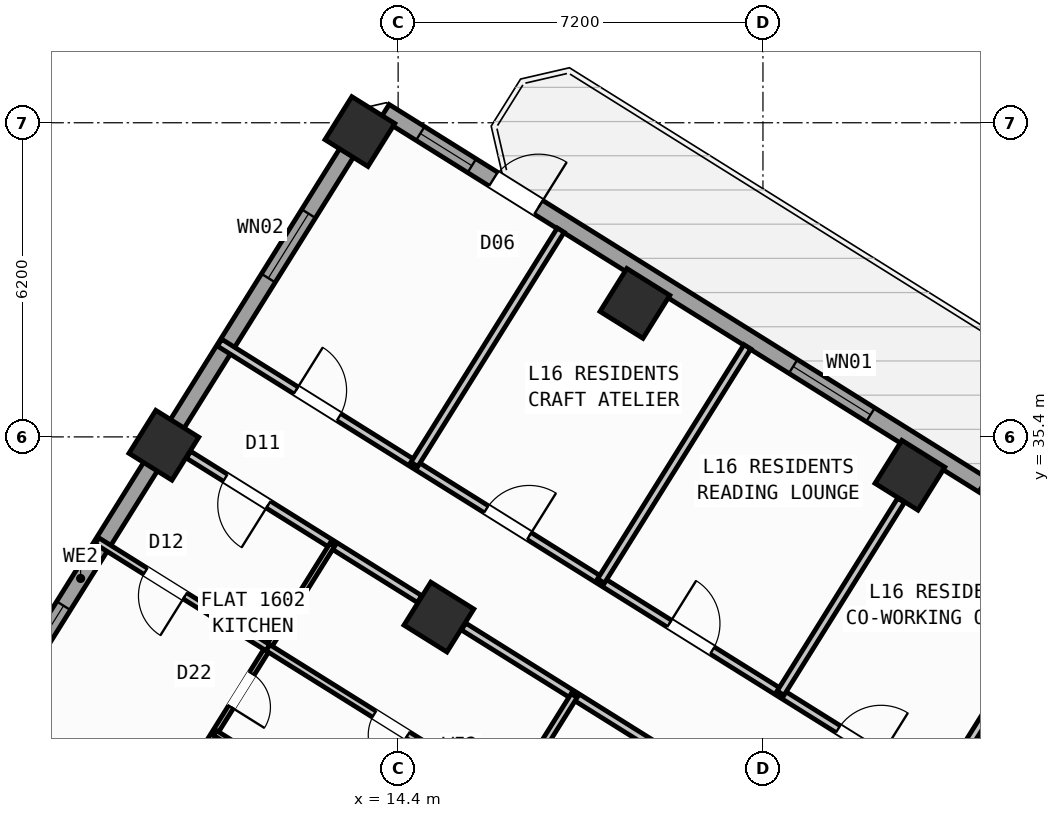
"""IFC4 building model, lengths in metres.
Left out: names, types, materials, properties, quantities, classifications, styles, units other than length and angle.
Written with IfcOpenShell. Run it as: python <this file> out.ifc"""

import sys

from ifc_helpers import new_model, si_unit, direction, frame, frame_2d, origin, origin_2d, place, context, subcontext, project, spatial, rectangle, hollow_rectangle, extrude, source, transform, mapped, element, fill, save


model = new_model("IFC4")
c1 = context("Model", 3, precision=1e-05, world=origin(), true_north=direction((0.0, 1.0)))
c2 = subcontext(c1, "Body", "Model", "MODEL_VIEW")
j1 = project(units=[si_unit("LENGTHUNIT", "METRE"), si_unit("PLANEANGLEUNIT", "RADIAN")], contexts=[c1])
p1 = place(None, origin())
s1 = spatial("IfcSite", under=j1, at=p1, CompositionType="ELEMENT")
p2 = place(p1, origin())
s2 = spatial("IfcBuilding", under=s1, at=p2, CompositionType="ELEMENT")
p3 = place(p2, frame((0.0, 0.0, 63.6)))
s3 = spatial("IfcBuildingStorey", under=s2, at=p3, CompositionType="ELEMENT", Elevation=63.6)
m1 = source(origin(), c2, "Body", "SweptSolid", [
    extrude(hollow_rectangle(XDim=1.0, YDim=1.0, WallThickness=0.04, at=origin_2d()), origin(), (0.0, 0.0, 1.0), 3.6),
])
for number, where, z_axis, x_axis in (
    (1, (24.5, 34.643, 0.0), (0.0, 0.0, 1.0), (-0.848, 0.53, 0.0)),
    (2, (19.073, 38.034, 0.0), (0.0, 0.0, 1.0), (-0.848, 0.53, 0.0)),
    (3, (15.205, 31.844, 0.0), (0.0, 0.0, 1.0), (-0.848, 0.53, 0.0)),
    (4, (13.646, 41.426, 0.0), (0.0, 0.0, 1.0), (-0.848, 0.53, 0.0)),
    (5, (9.777, 35.235, 0.0), (0.0, 0.0, 1.0), (-0.848, 0.53, 0.0)),
):
    element("IfcColumn", number, at=place(p3, frame(where, z_axis=z_axis, x_axis=x_axis)), inside=s3, PredefinedType="COLUMN", context=c2, shape_type="MappedRepresentation", body=[
        mapped(m1, transform((0.0, 0.0, 0.0), scale=1.0)),
    ])
p4 = place(p3, frame((2.415, 23.452, 0.0), z_axis=(0.0, 0.0, 1.0), x_axis=(0.52991049553, 0.848053575387, 0.0)))
e6 = element("IfcWall", 6, at=p4, inside=s3, PredefinedType="STANDARD", context=c2, shape_type="SweptSolid", body=[
    extrude(rectangle(XDim=21.587, YDim=0.32, at=frame_2d((10.794, 0.0))), origin(), (0.0, 0.0, 1.0), 2.725),
])
p5 = place(p4, frame((2.356, 0.0, 0.8)))
e7 = element("IfcOpeningElement", 7, at=p5, cuts=e6, PredefinedType="OPENING", context=c2, shape_type="SweptSolid", body=[
    extrude(rectangle(XDim=2.1, YDim=1.55, at=frame_2d((1.05, 0.775))), frame((0.0, 0.17, 0.0), z_axis=(0.0, -1.0, 0.0), x_axis=(1.0, 0.0, 0.0)), (0.0, 0.0, 1.0), 0.34),
])
p6 = place(p4, frame((8.359, 0.0, 0.85)))
e8 = element("IfcOpeningElement", 8, at=p6, cuts=e6, PredefinedType="OPENING", context=c2, shape_type="SweptSolid", body=[
    extrude(rectangle(XDim=1.8, YDim=1.5, at=frame_2d((0.9, 0.75))), frame((0.0, 0.17, 0.0), z_axis=(0.0, -1.0, 0.0), x_axis=(1.0, 0.0, 0.0)), (0.0, 0.0, 1.0), 0.34),
])
p7 = place(p4, frame((17.784, 0.0, 0.85)))
e9 = element("IfcOpeningElement", 9, at=p7, cuts=e6, PredefinedType="OPENING", context=c2, shape_type="SweptSolid", body=[
    extrude(rectangle(XDim=1.5, YDim=1.5, at=frame_2d((0.75, 0.75))), frame((0.0, 0.17, 0.0), z_axis=(0.0, -1.0, 0.0), x_axis=(1.0, 0.0, 0.0)), (0.0, 0.0, 1.0), 0.34),
])
p8 = place(p3, frame((14.138, 41.825, 0.0), z_axis=(0.0, 0.0, 1.0), x_axis=(0.848046498049, -0.529921821731, 0.0)))
e10 = element("IfcWall", 10, at=p8, inside=s3, PredefinedType="STANDARD", context=c2, shape_type="SweptSolid", body=[
    extrude(rectangle(XDim=31.588, YDim=0.32, at=frame_2d((15.794, 0.0))), origin(), (0.0, 0.0, 1.0), 3.35),
])
p9 = place(p8, frame((2.526, 0.0, 0.0)))
e11 = element("IfcOpeningElement", 11, at=p9, cuts=e10, PredefinedType="OPENING", context=c2, shape_type="SweptSolid", body=[
    extrude(rectangle(XDim=1.05, YDim=2.15, at=frame_2d((0.525, 1.075))), frame((0.0, 0.17, 0.0), z_axis=(0.0, -1.0, 0.0), x_axis=(1.0, 0.0, 0.0)), (0.0, 0.0, 1.0), 0.34),
])
p10 = place(p8, frame((0.825, 0.0, 0.95)))
e12 = element("IfcOpeningElement", 12, at=p10, cuts=e10, PredefinedType="OPENING", context=c2, shape_type="SweptSolid", body=[
    extrude(rectangle(XDim=1.2, YDim=1.4, at=frame_2d((0.6, 0.7))), frame((0.0, 0.17, 0.0), z_axis=(0.0, -1.0, 0.0), x_axis=(1.0, 0.0, 0.0)), (0.0, 0.0, 1.0), 0.34),
])
p11 = place(p8, frame((9.502, 0.0, 0.85)))
e13 = element("IfcOpeningElement", 13, at=p11, cuts=e10, PredefinedType="OPENING", context=c2, shape_type="SweptSolid", body=[
    extrude(rectangle(XDim=1.8, YDim=1.5, at=frame_2d((0.9, 0.75))), frame((0.0, 0.17, 0.0), z_axis=(0.0, -1.0, 0.0), x_axis=(1.0, 0.0, 0.0)), (0.0, 0.0, 1.0), 0.34),
])
p12 = place(p8, frame((13.899, 0.0, 0.85)))
e14 = element("IfcOpeningElement", 14, at=p12, cuts=e10, PredefinedType="OPENING", context=c2, shape_type="SweptSolid", body=[
    extrude(rectangle(XDim=1.5, YDim=1.5, at=frame_2d((0.75, 0.75))), frame((0.0, 0.17, 0.0), z_axis=(0.0, -1.0, 0.0), x_axis=(1.0, 0.0, 0.0)), (0.0, 0.0, 1.0), 0.34),
])
p13 = place(p8, frame((22.019, 0.0, 0.95)))
e15 = element("IfcOpeningElement", 15, at=p13, cuts=e10, PredefinedType="OPENING", context=c2, shape_type="SweptSolid", body=[
    extrude(rectangle(XDim=1.2, YDim=1.4, at=frame_2d((0.6, 0.7))), frame((0.0, 0.17, 0.0), z_axis=(0.0, -1.0, 0.0), x_axis=(1.0, 0.0, 0.0)), (0.0, 0.0, 1.0), 0.34),
])
p14 = place(p8, frame((27.569, 0.0, 0.95)))
e16 = element("IfcOpeningElement", 16, at=p14, cuts=e10, PredefinedType="OPENING", context=c2, shape_type="SweptSolid", body=[
    extrude(rectangle(XDim=1.2, YDim=1.4, at=frame_2d((0.6, 0.7))), frame((0.0, 0.17, 0.0), z_axis=(0.0, -1.0, 0.0), x_axis=(1.0, 0.0, 0.0)), (0.0, 0.0, 1.0), 0.34),
])
p15 = place(p3, frame((27.953, 33.016, 0.0), z_axis=(0.0, 0.0, 1.0), x_axis=(-0.529906322364, -0.848056182997, 0.0)))
e17 = element("IfcWall", 17, at=p15, inside=s3, PredefinedType="PARTITIONING", context=c2, shape_type="SweptSolid", body=[
    extrude(rectangle(XDim=5.45, YDim=0.16, at=frame_2d((2.725, 0.0))), origin(), (0.0, 0.0, 1.0), 3.34),
])
p16 = place(p3, frame((25.065, 28.394, 0.0), z_axis=(0.0, 0.0, 1.0), x_axis=(-0.848048310262, 0.529918921593, 0.0)))
e18 = element("IfcWall", 18, at=p16, inside=s3, PredefinedType="PARTITIONING", context=c2, shape_type="SweptSolid", body=[
    extrude(rectangle(XDim=16.73, YDim=0.16, at=frame_2d((8.365, 0.0))), origin(), (0.0, 0.0, 1.0), 3.34),
])
p17 = place(p16, frame((1.338, 0.0, 0.0)))
e19 = element("IfcOpeningElement", 19, at=p17, cuts=e18, PredefinedType="OPENING", context=c2, shape_type="SweptSolid", body=[
    extrude(rectangle(XDim=1.0, YDim=2.1, at=frame_2d((0.5, 1.05))), frame((0.0, 0.09, 0.0), z_axis=(0.0, -1.0, 0.0), x_axis=(1.0, 0.0, 0.0)), (0.0, 0.0, 1.0), 0.18),
])
p18 = place(p16, frame((5.265, 0.0, 0.0)))
e20 = element("IfcOpeningElement", 20, at=p18, cuts=e18, PredefinedType="OPENING", context=c2, shape_type="SweptSolid", body=[
    extrude(rectangle(XDim=1.0, YDim=2.1, at=frame_2d((0.5, 1.05))), frame((0.0, 0.09, 0.0), z_axis=(0.0, -1.0, 0.0), x_axis=(1.0, 0.0, 0.0)), (0.0, 0.0, 1.0), 0.18),
])
p19 = place(p16, frame((9.526, 0.0, 0.0)))
e21 = element("IfcOpeningElement", 21, at=p19, cuts=e18, PredefinedType="OPENING", context=c2, shape_type="SweptSolid", body=[
    extrude(rectangle(XDim=1.0, YDim=2.1, at=frame_2d((0.5, 1.05))), frame((0.0, 0.09, 0.0), z_axis=(0.0, -1.0, 0.0), x_axis=(1.0, 0.0, 0.0)), (0.0, 0.0, 1.0), 0.18),
])
p20 = place(p16, frame((13.954, 0.0, 0.0)))
e22 = element("IfcOpeningElement", 22, at=p20, cuts=e18, PredefinedType="OPENING", context=c2, shape_type="SweptSolid", body=[
    extrude(rectangle(XDim=1.0, YDim=2.1, at=frame_2d((0.5, 1.05))), frame((0.0, 0.09, 0.0), z_axis=(0.0, -1.0, 0.0), x_axis=(1.0, 0.0, 0.0)), (0.0, 0.0, 1.0), 0.18),
])
p21 = place(p3, frame((20.251, 28.808, 0.0), z_axis=(0.0, 0.0, 1.0), x_axis=(-0.848044224181, 0.529925460639, 0.0)))
e23 = element("IfcWall", 23, at=p21, inside=s3, PredefinedType="PARTITIONING", context=c2, shape_type="SweptSolid", body=[
    extrude(rectangle(XDim=5.376, YDim=0.16, at=frame_2d((2.688, 0.0))), origin(), (0.0, 0.0, 1.0), 2.725),
])
p22 = place(p3, frame((14.823, 32.2, 0.0), z_axis=(0.0, 0.0, 1.0), x_axis=(-0.848044224181, 0.529925460639, 0.0)))
e24 = element("IfcWall", 24, at=p22, inside=s3, PredefinedType="PARTITIONING", context=c2, shape_type="SweptSolid", body=[
    extrude(rectangle(XDim=5.376, YDim=0.16, at=frame_2d((2.688, 0.0))), origin(), (0.0, 0.0, 1.0), 2.725),
])
p23 = place(p22, frame((3.518, 0.0, 0.0)))
e25 = element("IfcOpeningElement", 25, at=p23, cuts=e24, PredefinedType="OPENING", context=c2, shape_type="SweptSolid", body=[
    extrude(rectangle(XDim=1.0, YDim=2.1, at=frame_2d((0.5, 1.05))), frame((0.0, 0.09, 0.0), z_axis=(0.0, -1.0, 0.0), x_axis=(1.0, 0.0, 0.0)), (0.0, 0.0, 1.0), 0.18),
])
p24 = place(p3, frame((13.104, 33.274, 0.0), z_axis=(0.0, 0.0, 1.0), x_axis=(-0.529916182913, -0.848050021571, 0.0)))
e26 = element("IfcWall", 26, at=p24, inside=s3, PredefinedType="PARTITIONING", context=c2, shape_type="SweptSolid", body=[
    extrude(rectangle(XDim=14.32, YDim=0.11, at=frame_2d((7.16, 0.0))), origin(), (0.0, 0.0, 1.0), 3.34),
])
p25 = place(p24, frame((3.0, 0.0, 0.0)))
e27 = element("IfcOpeningElement", 27, at=p25, cuts=e26, PredefinedType="OPENING", context=c2, shape_type="SweptSolid", body=[
    extrude(rectangle(XDim=0.78, YDim=2.05, at=frame_2d((0.39, 1.025))), frame((0.0, 0.065, 0.0), z_axis=(0.0, -1.0, 0.0), x_axis=(1.0, 0.0, 0.0)), (0.0, 0.0, 1.0), 0.13),
])
p26 = place(p3, frame((11.832, 31.239, 0.0), z_axis=(0.0, 0.0, 1.0), x_axis=(-0.848025873403, 0.529954826413, 0.0)))
e28 = element("IfcWall", 28, at=p26, inside=s3, PredefinedType="PLUMBINGWALL", context=c2, shape_type="SweptSolid", body=[
    extrude(rectangle(XDim=3.98, YDim=0.14, at=frame_2d((1.99, 0.0))), origin(), (0.0, 0.0, 1.0), 3.34),
])
p27 = place(p26, frame((1.93, 0.0, 0.0)))
e29 = element("IfcOpeningElement", 29, at=p27, cuts=e28, PredefinedType="OPENING", context=c2, shape_type="SweptSolid", body=[
    extrude(rectangle(XDim=0.92, YDim=2.08, at=frame_2d((0.46, 1.04))), frame((0.0, 0.08, 0.0), z_axis=(0.0, -1.0, 0.0), x_axis=(1.0, 0.0, 0.0)), (0.0, 0.0, 1.0), 0.16),
])
p28 = place(p3, frame((19.413, 26.501, 0.0), z_axis=(0.0, 0.0, 1.0), x_axis=(-0.848051995289, 0.529913024266, 0.0)))
e30 = element("IfcWall", 30, at=p28, inside=s3, PredefinedType="PLUMBINGWALL", context=c2, shape_type="SweptSolid", body=[
    extrude(rectangle(XDim=8.94, YDim=0.14, at=frame_2d((4.47, 0.0))), origin(), (0.0, 0.0, 1.0), 3.34),
])
p29 = place(p28, frame((5.688, 0.0, 0.0)))
e31 = element("IfcOpeningElement", 31, at=p29, cuts=e30, PredefinedType="OPENING", context=c2, shape_type="SweptSolid", body=[
    extrude(rectangle(XDim=0.78, YDim=2.05, at=frame_2d((0.39, 1.025))), frame((0.0, 0.08, 0.0), z_axis=(0.0, -1.0, 0.0), x_axis=(1.0, 0.0, 0.0)), (0.0, 0.0, 1.0), 0.16),
])
p30 = place(p28, frame((1.218, 0.0, 0.0)))
e32 = element("IfcOpeningElement", 32, at=p30, cuts=e30, PredefinedType="OPENING", context=c2, shape_type="SweptSolid", body=[
    extrude(rectangle(XDim=0.78, YDim=2.05, at=frame_2d((0.39, 1.025))), frame((0.0, 0.08, 0.0), z_axis=(0.0, -1.0, 0.0), x_axis=(1.0, 0.0, 0.0)), (0.0, 0.0, 1.0), 0.16),
])
p31 = place(p3, frame((17.874, 30.294, 0.0), z_axis=(0.0, 0.0, 1.0), x_axis=(-0.52988967038, -0.848066587731, 0.0)))
e33 = element("IfcWall", 33, at=p31, inside=s3, PredefinedType="PLUMBINGWALL", context=c2, shape_type="SweptSolid", body=[
    extrude(rectangle(XDim=2.41, YDim=0.14, at=frame_2d((1.205, 0.0))), origin(), (0.0, 0.0, 1.0), 3.34),
])
p32 = place(p3, frame((18.364, 24.823, 0.0), z_axis=(0.0, 0.0, 1.0), x_axis=(-0.848056599187, 0.529905656296, 0.0)))
e34 = element("IfcWall", 34, at=p32, inside=s3, PredefinedType="PARTITIONING", context=c2, shape_type="SweptSolid", body=[
    extrude(rectangle(XDim=8.94, YDim=0.11, at=frame_2d((4.47, 0.0))), origin(), (0.0, 0.0, 1.0), 3.34),
])
p33 = place(p32, frame((0.434, 0.0, 0.0)))
e35 = element("IfcOpeningElement", 35, at=p33, cuts=e34, PredefinedType="OPENING", context=c2, shape_type="SweptSolid", body=[
    extrude(rectangle(XDim=0.92, YDim=2.08, at=frame_2d((0.46, 1.04))), frame((0.0, 0.065, 0.0), z_axis=(0.0, -1.0, 0.0), x_axis=(1.0, 0.0, 0.0)), (0.0, 0.0, 1.0), 0.13),
])
p34 = place(p32, frame((2.222, 0.0, 0.0)))
e36 = element("IfcOpeningElement", 36, at=p34, cuts=e34, PredefinedType="OPENING", context=c2, shape_type="SweptSolid", body=[
    extrude(rectangle(XDim=0.92, YDim=2.08, at=frame_2d((0.46, 1.04))), frame((0.0, 0.065, 0.0), z_axis=(0.0, -1.0, 0.0), x_axis=(1.0, 0.0, 0.0)), (0.0, 0.0, 1.0), 0.13),
])
p35 = place(p32, frame((4.01, 0.0, 0.0)))
e37 = element("IfcOpeningElement", 37, at=p35, cuts=e34, PredefinedType="OPENING", context=c2, shape_type="SweptSolid", body=[
    extrude(rectangle(XDim=0.92, YDim=2.08, at=frame_2d((0.46, 1.04))), frame((0.0, 0.065, 0.0), z_axis=(0.0, -1.0, 0.0), x_axis=(1.0, 0.0, 0.0)), (0.0, 0.0, 1.0), 0.13),
])
p36 = place(p32, frame((5.798, 0.0, 0.0)))
e38 = element("IfcOpeningElement", 38, at=p36, cuts=e34, PredefinedType="OPENING", context=c2, shape_type="SweptSolid", body=[
    extrude(rectangle(XDim=0.92, YDim=2.08, at=frame_2d((0.46, 1.04))), frame((0.0, 0.065, 0.0), z_axis=(0.0, -1.0, 0.0), x_axis=(1.0, 0.0, 0.0)), (0.0, 0.0, 1.0), 0.13),
])
p37 = place(p32, frame((7.586, 0.0, 0.0)))
e39 = element("IfcOpeningElement", 39, at=p37, cuts=e34, PredefinedType="OPENING", context=c2, shape_type="SweptSolid", body=[
    extrude(rectangle(XDim=0.92, YDim=2.08, at=frame_2d((0.46, 1.04))), frame((0.0, 0.065, 0.0), z_axis=(0.0, -1.0, 0.0), x_axis=(1.0, 0.0, 0.0)), (0.0, 0.0, 1.0), 0.13),
])
p38 = place(p3, frame((24.326, 34.148, 0.0), z_axis=(0.0, 0.0, 1.0), x_axis=(-0.529915808518, -0.848050255517, 0.0)))
e40 = element("IfcWall", 40, at=p38, inside=s3, PredefinedType="PARTITIONING", context=c2, shape_type="SweptSolid", body=[
    extrude(rectangle(XDim=4.488, YDim=0.16, at=frame_2d((2.244, 0.0))), origin(), (0.0, 0.0, 1.0), 2.725),
])
for number, where, z_axis, x_axis in (
    (41, (21.292, 37.178, 0.0), (0.0, 0.0, 1.0), (-0.53, -0.848, 0.0)),
    (42, (17.608, 39.48, 0.0), (0.0, 0.0, 1.0), (-0.53, -0.848, 0.0)),
):
    element("IfcWall", number, at=place(p3, frame(where, z_axis=z_axis, x_axis=x_axis)), inside=s3, PredefinedType="PARTITIONING", context=c2, shape_type="SweptSolid", body=[
        extrude(rectangle(XDim=5.45, YDim=0.16, at=frame_2d((2.725, 0.0))), origin(), (0.0, 0.0, 1.0), 2.995),
    ])
m2 = source(origin(), c2, "Body", "SweptSolid", [
    extrude(rectangle(XDim=1.05, YDim=2.15, at=frame_2d((0.525, 1.075))), frame((0.0, 0.025, 0.0), z_axis=(0.0, -1.0, 0.0), x_axis=(1.0, 0.0, 0.0)), (0.0, 0.0, 1.0), 0.05),
])
p39 = place(p9, origin())
e43 = element("IfcDoor", 43, at=p39, inside=s3, OperationType="SINGLE_SWING_RIGHT", PredefinedType="DOOR", context=c2, shape_type="MappedRepresentation", body=[
    mapped(m2, transform((0.0, 0.0, 0.0), scale=1.0)),
])
fill(e11, e43)
m3 = source(origin(), c2, "Body", "SweptSolid", [
    extrude(rectangle(XDim=1.8, YDim=1.5, at=frame_2d((0.9, 0.75))), frame((0.0, 0.03, 0.0), z_axis=(0.0, -1.0, 0.0), x_axis=(1.0, 0.0, 0.0)), (0.0, 0.0, 1.0), 0.06),
])
p40 = place(p6, origin())
e44 = element("IfcWindow", 44, at=p40, inside=s3, PartitioningType="SINGLE_PANEL", PredefinedType="WINDOW", context=c2, shape_type="MappedRepresentation", body=[
    mapped(m3, transform((0.0, 0.0, 0.0), scale=1.0)),
])
fill(e8, e44)
m4 = source(origin(), c2, "Body", "SweptSolid", [
    extrude(rectangle(XDim=1.5, YDim=1.5, at=frame_2d((0.75, 0.75))), frame((0.0, 0.03, 0.0), z_axis=(0.0, -1.0, 0.0), x_axis=(1.0, 0.0, 0.0)), (0.0, 0.0, 1.0), 0.06),
])
p41 = place(p7, origin())
e45 = element("IfcWindow", 45, at=p41, inside=s3, PartitioningType="SINGLE_PANEL", PredefinedType="WINDOW", context=c2, shape_type="MappedRepresentation", body=[
    mapped(m4, transform((0.0, 0.0, 0.0), scale=1.0)),
])
fill(e9, e45)
m5 = source(origin(), c2, "Body", "SweptSolid", [
    extrude(rectangle(XDim=1.2, YDim=1.4, at=frame_2d((0.6, 0.7))), frame((0.0, 0.03, 0.0), z_axis=(0.0, -1.0, 0.0), x_axis=(1.0, 0.0, 0.0)), (0.0, 0.0, 1.0), 0.06),
])
p42 = place(p10, origin())
e46 = element("IfcWindow", 46, at=p42, inside=s3, PartitioningType="SINGLE_PANEL", PredefinedType="WINDOW", context=c2, shape_type="MappedRepresentation", body=[
    mapped(m5, transform((0.0, 0.0, 0.0), scale=1.0)),
])
fill(e12, e46)
p43 = place(p11, origin())
e47 = element("IfcWindow", 47, at=p43, inside=s3, PartitioningType="SINGLE_PANEL", PredefinedType="WINDOW", context=c2, shape_type="MappedRepresentation", body=[
    mapped(m3, transform((0.0, 0.0, 0.0), scale=1.0)),
])
fill(e13, e47)
m6 = source(origin(), c2, "Body", "SweptSolid", [
    extrude(rectangle(XDim=1.0, YDim=2.1, at=frame_2d((0.5, 1.05))), frame((0.0, 0.025, 0.0), z_axis=(0.0, -1.0, 0.0), x_axis=(1.0, 0.0, 0.0)), (0.0, 0.0, 1.0), 0.05),
])
p44 = place(p23, origin())
e48 = element("IfcDoor", 48, at=p44, inside=s3, OperationType="SINGLE_SWING_LEFT", PredefinedType="DOOR", context=c2, shape_type="MappedRepresentation", body=[
    mapped(m6, transform((0.0, 0.0, 0.0), scale=1.0)),
])
fill(e25, e48)
m7 = source(origin(), c2, "Body", "SweptSolid", [
    extrude(rectangle(XDim=0.92, YDim=2.08, at=frame_2d((0.46, 1.04))), frame((0.0, 0.025, 0.0), z_axis=(0.0, -1.0, 0.0), x_axis=(1.0, 0.0, 0.0)), (0.0, 0.0, 1.0), 0.05),
])
p45 = place(p27, origin())
e49 = element("IfcDoor", 49, at=p45, inside=s3, OperationType="SINGLE_SWING_LEFT", PredefinedType="DOOR", context=c2, shape_type="MappedRepresentation", body=[
    mapped(m7, transform((0.0, 0.0, 0.0), scale=1.0)),
])
fill(e29, e49)
m8 = source(origin(), c2, "Body", "SweptSolid", [
    extrude(rectangle(XDim=0.78, YDim=2.05, at=frame_2d((0.39, 1.025))), frame((0.0, 0.025, 0.0), z_axis=(0.0, -1.0, 0.0), x_axis=(1.0, 0.0, 0.0)), (0.0, 0.0, 1.0), 0.05),
])
p46 = place(p25, origin())
e50 = element("IfcDoor", 50, at=p46, inside=s3, OperationType="SINGLE_SWING_RIGHT", PredefinedType="DOOR", context=c2, shape_type="MappedRepresentation", body=[
    mapped(m8, transform((0.0, 0.0, 0.0), scale=1.0)),
])
fill(e27, e50)
p47 = place(p29, origin())
e51 = element("IfcDoor", 51, at=p47, inside=s3, OperationType="SINGLE_SWING_LEFT", PredefinedType="DOOR", context=c2, shape_type="MappedRepresentation", body=[
    mapped(m8, transform((0.0, 0.0, 0.0), scale=1.0)),
])
fill(e31, e51)
p48 = place(p17, frame((1.0, 0.0, 0.0), z_axis=(0.0, 0.0, 1.0), x_axis=(-1.0, 0.0, 0.0)))
e52 = element("IfcDoor", 52, at=p48, inside=s3, OperationType="SINGLE_SWING_RIGHT", PredefinedType="DOOR", context=c2, shape_type="MappedRepresentation", body=[
    mapped(m6, transform((0.0, 0.0, 0.0), scale=1.0)),
])
fill(e19, e52)
p49 = place(p18, frame((1.0, 0.0, 0.0), z_axis=(0.0, 0.0, 1.0), x_axis=(-1.0, 0.0, 0.0)))
e53 = element("IfcDoor", 53, at=p49, inside=s3, OperationType="SINGLE_SWING_LEFT", PredefinedType="DOOR", context=c2, shape_type="MappedRepresentation", body=[
    mapped(m6, transform((0.0, 0.0, 0.0), scale=1.0)),
])
fill(e20, e53)
p50 = place(p19, frame((1.0, 0.0, 0.0), z_axis=(0.0, 0.0, 1.0), x_axis=(-1.0, 0.0, 0.0)))
e54 = element("IfcDoor", 54, at=p50, inside=s3, OperationType="SINGLE_SWING_RIGHT", PredefinedType="DOOR", context=c2, shape_type="MappedRepresentation", body=[
    mapped(m6, transform((0.0, 0.0, 0.0), scale=1.0)),
])
fill(e21, e54)
p51 = place(p20, frame((1.0, 0.0, 0.0), z_axis=(0.0, 0.0, 1.0), x_axis=(-1.0, 0.0, 0.0)))
e55 = element("IfcDoor", 55, at=p51, inside=s3, OperationType="SINGLE_SWING_LEFT", PredefinedType="DOOR", context=c2, shape_type="MappedRepresentation", body=[
    mapped(m6, transform((0.0, 0.0, 0.0), scale=1.0)),
])
fill(e22, e55)
save(model, sys.argv[1])
